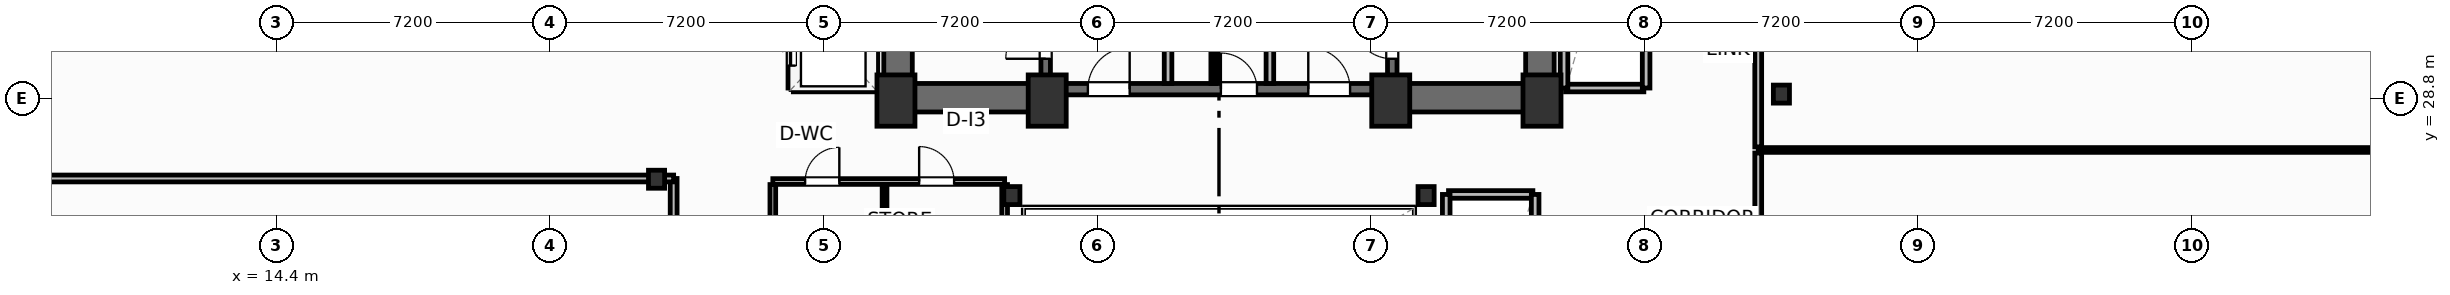
"""IFC4 building model, lengths in metres.
Left out: names, types, materials, properties, quantities, classifications, styles, units other than length and angle.
Written with IfcOpenShell. Run it as: python <this file> out.ifc"""

import sys

from ifc_helpers import new_model, si_unit, direction, frame, frame_2d, origin, origin_2d, place, context, subcontext, project, spatial, rectangle, i_section, extrude, element, fill, save


model = new_model("IFC4")
c1 = context("Model", 3, precision=1e-05, world=origin(), true_north=direction((0.0, 1.0)))
c2 = subcontext(c1, "Body", "Model", "MODEL_VIEW")
j1 = project(units=[si_unit("LENGTHUNIT", "METRE"), si_unit("PLANEANGLEUNIT", "RADIAN")], contexts=[c1])
p1 = place(None, origin())
s1 = spatial("IfcSite", under=j1, at=p1, CompositionType="ELEMENT")
p2 = place(p1, origin())
s2 = spatial("IfcBuilding", under=s1, at=p2, CompositionType="ELEMENT")
p3 = place(p2, frame((0.0, 0.0, 109.5)))
s3 = spatial("IfcBuildingStorey", under=s2, at=p3, CompositionType="ELEMENT", Elevation=109.5)
for number, where, z_axis, x_axis in (
    (1, (30.7, 28.75, 0.0), (0.0, 0.0, 1.0), (1.0, 0.0, 0.0)),
    (2, (34.68, 28.75, 0.0), (0.0, 0.0, 1.0), (1.0, 0.0, 0.0)),
    (3, (43.72, 28.75, 0.0), (0.0, 0.0, 1.0), (1.0, 0.0, 0.0)),
    (4, (47.7, 28.75, 0.0), (0.0, 0.0, 1.0), (1.0, 0.0, 0.0)),
):
    element("IfcColumn", number, at=place(p3, frame(where, z_axis=z_axis, x_axis=x_axis)), inside=s3, PredefinedType="COLUMN", context=c2, shape_type="SweptSolid", body=[
        extrude(rectangle(XDim=1.0, YDim=1.35, at=origin_2d()), origin(), (0.0, 0.0, 1.0), 3.7),
    ])
for number, where, z_axis, x_axis in (
    (5, (33.75, 26.25, 0.0), (0.0, 0.0, 1.0), (1.0, 0.0, 0.0)),
    (6, (44.65, 26.25, 0.0), (0.0, 0.0, 1.0), (1.0, 0.0, 0.0)),
    (7, (24.4, 26.68, 0.0), (0.0, 0.0, 1.0), (1.0, 0.0, 0.0)),
    (8, (54.0, 28.92, 0.0), (0.0, 0.0, 1.0), (1.0, 0.0, 0.0)),
):
    element("IfcColumn", number, at=place(p3, frame(where, z_axis=z_axis, x_axis=x_axis)), inside=s3, PredefinedType="COLUMN", context=c2, shape_type="SweptSolid", body=[
        extrude(i_section(OverallWidth=0.424, OverallDepth=0.474, WebThickness=0.048, FlangeThickness=0.077, FilletRadius=0.025, at=origin_2d()), origin(), (0.0, 0.0, 1.0), 3.7),
    ])
for number, where, z_axis, x_axis in (
    (9, (30.755, 29.2, 0.0), (0.0, 0.0, 1.0), (0.0, 1.0, 0.0)),
    (10, (47.645, 29.2, 0.0), (0.0, 0.0, 1.0), (0.0, 1.0, 0.0)),
):
    element("IfcWall", number, at=place(p3, frame(where, z_axis=z_axis, x_axis=x_axis)), inside=s3, PredefinedType="SHEAR", context=c2, shape_type="SweptSolid", body=[
        extrude(rectangle(XDim=9.22, YDim=0.75, at=frame_2d((4.61, 0.0))), origin(), (0.0, 0.0, 1.0), 3.45),
    ])
p4 = place(p3, frame((30.38, 28.825, 0.0), z_axis=(0.0, 0.0, 1.0), x_axis=(1.0, 0.0, 0.0)))
e11 = element("IfcWall", 11, at=p4, inside=s3, PredefinedType="SHEAR", context=c2, shape_type="SweptSolid", body=[
    extrude(rectangle(XDim=4.42, YDim=0.75, at=frame_2d((2.21, 0.0))), origin(), (0.0, 0.0, 1.0), 3.45),
])
p5 = place(p3, frame((43.6, 28.825, 0.0), z_axis=(0.0, 0.0, 1.0), x_axis=(1.0, 0.0, 0.0)))
e12 = element("IfcWall", 12, at=p5, inside=s3, PredefinedType="SHEAR", context=c2, shape_type="SweptSolid", body=[
    extrude(rectangle(XDim=4.42, YDim=0.75, at=frame_2d((2.21, 0.0))), origin(), (0.0, 0.0, 1.0), 3.45),
])
p6 = place(p3, frame((34.8, 29.05, 0.0), z_axis=(0.0, 0.0, 1.0), x_axis=(1.0, 0.0, 0.0)))
e13 = element("IfcWall", 13, at=p6, inside=s3, PredefinedType="SHEAR", context=c2, shape_type="SweptSolid", body=[
    extrude(rectangle(XDim=8.8, YDim=0.3, at=frame_2d((4.4, 0.0))), origin(), (0.0, 0.0, 1.0), 3.45),
])
p7 = place(p6, frame((0.95, 0.0, 0.0)))
e14 = element("IfcOpeningElement", 14, at=p7, cuts=e13, PredefinedType="OPENING", context=c2, shape_type="SweptSolid", body=[
    extrude(rectangle(XDim=1.1, YDim=2.15, at=frame_2d((0.55, 1.075))), frame((0.0, 0.16, 0.0), z_axis=(0.0, -1.0, 0.0), x_axis=(1.0, 0.0, 0.0)), (0.0, 0.0, 1.0), 0.32),
])
p8 = place(p6, frame((6.75, 0.0, 0.0)))
e15 = element("IfcOpeningElement", 15, at=p8, cuts=e13, PredefinedType="OPENING", context=c2, shape_type="SweptSolid", body=[
    extrude(rectangle(XDim=1.1, YDim=2.15, at=frame_2d((0.55, 1.075))), frame((0.0, 0.16, 0.0), z_axis=(0.0, -1.0, 0.0), x_axis=(1.0, 0.0, 0.0)), (0.0, 0.0, 1.0), 0.32),
])
p9 = place(p6, frame((4.45, 0.0, 0.0)))
e16 = element("IfcOpeningElement", 16, at=p9, cuts=e13, PredefinedType="OPENING", context=c2, shape_type="SweptSolid", body=[
    extrude(rectangle(XDim=0.95, YDim=2.15, at=frame_2d((0.475, 1.075))), frame((0.0, 0.16, 0.0), z_axis=(0.0, -1.0, 0.0), x_axis=(1.0, 0.0, 0.0)), (0.0, 0.0, 1.0), 0.32),
])
p10 = place(p3, frame((34.64, 29.2, 0.0), z_axis=(0.0, 0.0, 1.0), x_axis=(0.0, 1.0, 0.0)))
e17 = element("IfcWall", 17, at=p10, inside=s3, PredefinedType="SHEAR", context=c2, shape_type="SweptSolid", body=[
    extrude(rectangle(XDim=9.22, YDim=0.25, at=frame_2d((4.61, 0.0))), origin(), (0.0, 0.0, 1.0), 3.45),
])
p11 = place(p10, frame((0.65, 0.0, 0.0)))
e18 = element("IfcOpeningElement", 18, at=p11, cuts=e17, PredefinedType="OPENING", context=c2, shape_type="SweptSolid", body=[
    extrude(rectangle(XDim=1.05, YDim=2.15, at=frame_2d((0.525, 1.075))), frame((0.0, 0.135, 0.0), z_axis=(0.0, -1.0, 0.0), x_axis=(1.0, 0.0, 0.0)), (0.0, 0.0, 1.0), 0.27),
])
p12 = place(p3, frame((43.76, 29.2, 0.0), z_axis=(0.0, 0.0, 1.0), x_axis=(0.0, 1.0, 0.0)))
e19 = element("IfcWall", 19, at=p12, inside=s3, PredefinedType="SHEAR", context=c2, shape_type="SweptSolid", body=[
    extrude(rectangle(XDim=9.22, YDim=0.25, at=frame_2d((4.61, 0.0))), origin(), (0.0, 0.0, 1.0), 3.45),
])
p13 = place(p12, frame((0.65, 0.0, 0.0)))
e20 = element("IfcOpeningElement", 20, at=p13, cuts=e19, PredefinedType="OPENING", context=c2, shape_type="SweptSolid", body=[
    extrude(rectangle(XDim=1.05, YDim=2.15, at=frame_2d((0.525, 1.075))), frame((0.0, 0.135, 0.0), z_axis=(0.0, -1.0, 0.0), x_axis=(1.0, 0.0, 0.0)), (0.0, 0.0, 1.0), 0.27),
])
p14 = place(p3, frame((24.85, 19.24, 0.0), z_axis=(0.0, 0.0, 1.0), x_axis=(0.0, 1.0, 0.0)))
e21 = element("IfcWall", 21, at=p14, inside=s3, PredefinedType="PARTITIONING", context=c2, shape_type="SweptSolid", body=[
    extrude(rectangle(XDim=7.46, YDim=0.18, at=frame_2d((3.73, 0.0))), origin(), (0.0, 0.0, 1.0), 3.45),
])
p15 = place(p14, frame((3.235, 0.0, 0.0)))
e22 = element("IfcOpeningElement", 22, at=p15, cuts=e21, PredefinedType="OPENING", context=c2, shape_type="SweptSolid", body=[
    extrude(rectangle(XDim=0.95, YDim=2.05, at=frame_2d((0.475, 1.025))), frame((0.0, 0.1, 0.0), z_axis=(0.0, -1.0, 0.0), x_axis=(1.0, 0.0, 0.0)), (0.0, 0.0, 1.0), 0.2),
])
p16 = place(p3, frame((-0.071, 26.7, 0.0), z_axis=(0.0, 0.0, 1.0), x_axis=(1.0, 0.0, 0.0)))
e23 = element("IfcWall", 23, at=p16, inside=s3, PredefinedType="PARTITIONING", context=c2, shape_type="SweptSolid", body=[
    extrude(rectangle(XDim=24.921, YDim=0.18, at=frame_2d((12.46, 0.0))), origin(), (0.0, 0.0, 1.0), 2.662),
])
p17 = place(p3, frame((53.39, 19.3, 0.0), z_axis=(0.0, 0.0, 1.0), x_axis=(0.0, 1.0, 0.0)))
e24 = element("IfcWall", 24, at=p17, inside=s3, PredefinedType="PARTITIONING", context=c2, shape_type="SweptSolid", body=[
    extrude(rectangle(XDim=8.07, YDim=0.18, at=frame_2d((4.035, 0.0))), origin(), (0.0, 0.0, 1.0), 3.45),
])
p18 = place(p17, frame((2.2, 0.0, 0.0)))
e25 = element("IfcOpeningElement", 25, at=p18, cuts=e24, PredefinedType="OPENING", context=c2, shape_type="SweptSolid", body=[
    extrude(rectangle(XDim=0.92, YDim=2.05, at=frame_2d((0.46, 1.025))), frame((0.0, 0.1, 0.0), z_axis=(0.0, -1.0, 0.0), x_axis=(1.0, 0.0, 0.0)), (0.0, 0.0, 1.0), 0.2),
])
p19 = place(p3, frame((53.39, 27.53, 0.0), z_axis=(0.0, 0.0, 1.0), x_axis=(0.0, 1.0, 0.0)))
e26 = element("IfcWall", 26, at=p19, inside=s3, PredefinedType="PARTITIONING", context=c2, shape_type="SweptSolid", body=[
    extrude(rectangle(XDim=11.67, YDim=0.18, at=frame_2d((5.835, 0.0))), origin(), (0.0, 0.0, 1.0), 3.45),
])
p20 = place(p19, frame((5.8, 0.0, 0.0)))
e27 = element("IfcOpeningElement", 27, at=p20, cuts=e26, PredefinedType="OPENING", context=c2, shape_type="SweptSolid", body=[
    extrude(rectangle(XDim=0.92, YDim=2.05, at=frame_2d((0.46, 1.025))), frame((0.0, 0.1, 0.0), z_axis=(0.0, -1.0, 0.0), x_axis=(1.0, 0.0, 0.0)), (0.0, 0.0, 1.0), 0.2),
])
p21 = place(p3, frame((53.39, 27.45, 0.0), z_axis=(0.0, 0.0, 1.0), x_axis=(1.0, 0.0, 0.0)))
e28 = element("IfcWall", 28, at=p21, inside=s3, PredefinedType="PARTITIONING", context=c2, shape_type="SweptSolid", body=[
    extrude(rectangle(XDim=23.61, YDim=0.125, at=frame_2d((11.805, 0.0))), origin(), (0.0, 0.0, 1.0), 3.45),
])
for number, where, z_axis, x_axis in (
    (29, (37.86, 29.2, 0.0), (0.0, 0.0, 1.0), (0.0, 1.0, 0.0)),
    (30, (40.54, 29.2, 0.0), (0.0, 0.0, 1.0), (0.0, 1.0, 0.0)),
):
    element("IfcWall", number, at=place(p3, frame(where, z_axis=z_axis, x_axis=x_axis)), inside=s3, PredefinedType="PARTITIONING", context=c2, shape_type="SweptSolid", body=[
        extrude(rectangle(XDim=5.18, YDim=0.2, at=frame_2d((2.59, 0.0))), origin(), (0.0, 0.0, 1.0), 3.45),
    ])
p22 = place(p3, frame((39.05, 29.2, 0.0), z_axis=(0.0, 0.0, 1.0), x_axis=(0.0, 1.0, 0.0)))
e31 = element("IfcWall", 31, at=p22, inside=s3, PredefinedType="PARTITIONING", context=c2, shape_type="SweptSolid", body=[
    extrude(rectangle(XDim=5.22, YDim=0.125, at=frame_2d((2.61, 0.0))), origin(), (0.0, 0.0, 1.0), 3.45),
])
p23 = place(p22, frame((2.05, 0.0, 0.0)))
e32 = element("IfcOpeningElement", 32, at=p23, cuts=e31, PredefinedType="OPENING", context=c2, shape_type="SweptSolid", body=[
    extrude(rectangle(XDim=0.85, YDim=2.05, at=frame_2d((0.425, 1.025))), frame((0.0, 0.073, 0.0), z_axis=(0.0, -1.0, 0.0), x_axis=(1.0, 0.0, 0.0)), (0.0, 0.0, 1.0), 0.145),
])
p24 = place(p3, frame((27.46, 26.62, 0.0), z_axis=(0.0, 0.0, 1.0), x_axis=(1.0, 0.0, 0.0)))
e33 = element("IfcWall", 33, at=p24, inside=s3, PredefinedType="PARTITIONING", context=c2, shape_type="SweptSolid", body=[
    extrude(rectangle(XDim=6.1, YDim=0.15, at=frame_2d((3.05, 0.0))), origin(), (0.0, 0.0, 1.0), 2.662),
])
p25 = place(p24, frame((0.85, 0.0, 0.0)))
e34 = element("IfcOpeningElement", 34, at=p25, cuts=e33, PredefinedType="OPENING", context=c2, shape_type="SweptSolid", body=[
    extrude(rectangle(XDim=0.9, YDim=2.05, at=frame_2d((0.45, 1.025))), frame((0.0, 0.085, 0.0), z_axis=(0.0, -1.0, 0.0), x_axis=(1.0, 0.0, 0.0)), (0.0, 0.0, 1.0), 0.17),
])
p26 = place(p24, frame((3.85, 0.0, 0.0)))
e35 = element("IfcOpeningElement", 35, at=p26, cuts=e33, PredefinedType="OPENING", context=c2, shape_type="SweptSolid", body=[
    extrude(rectangle(XDim=0.92, YDim=2.05, at=frame_2d((0.46, 1.025))), frame((0.0, 0.085, 0.0), z_axis=(0.0, -1.0, 0.0), x_axis=(1.0, 0.0, 0.0)), (0.0, 0.0, 1.0), 0.17),
])
p27 = place(p3, frame((30.4, 23.0, 0.0), z_axis=(0.0, 0.0, 1.0), x_axis=(0.0, 1.0, 0.0)))
e36 = element("IfcWall", 36, at=p27, inside=s3, PredefinedType="PARTITIONING", context=c2, shape_type="SweptSolid", body=[
    extrude(rectangle(XDim=3.54, YDim=0.125, at=frame_2d((1.77, 0.0))), origin(), (0.0, 0.0, 1.0), 3.45),
])
p28 = place(p3, frame((27.46, 19.38, 0.0), z_axis=(0.0, 0.0, 1.0), x_axis=(0.0, 1.0, 0.0)))
e37 = element("IfcWall", 37, at=p28, inside=s3, PredefinedType="PARTITIONING", context=c2, shape_type="SweptSolid", body=[
    extrude(rectangle(XDim=7.16, YDim=0.15, at=frame_2d((3.58, 0.0))), origin(), (0.0, 0.0, 1.0), 3.45),
])
p29 = place(p28, frame((1.1, 0.0, 0.0)))
e38 = element("IfcOpeningElement", 38, at=p29, cuts=e37, PredefinedType="OPENING", context=c2, shape_type="SweptSolid", body=[
    extrude(rectangle(XDim=0.95, YDim=2.05, at=frame_2d((0.475, 1.025))), frame((0.0, 0.085, 0.0), z_axis=(0.0, -1.0, 0.0), x_axis=(1.0, 0.0, 0.0)), (0.0, 0.0, 1.0), 0.17),
])
p30 = place(p3, frame((33.56, 19.38, 0.0), z_axis=(0.0, 0.0, 1.0), x_axis=(0.0, 1.0, 0.0)))
e39 = element("IfcWall", 39, at=p30, inside=s3, PredefinedType="PARTITIONING", context=c2, shape_type="SweptSolid", body=[
    extrude(rectangle(XDim=7.16, YDim=0.15, at=frame_2d((3.58, 0.0))), origin(), (0.0, 0.0, 1.0), 2.824),
])
p31 = place(p3, frame((28.0, 29.08, 0.0), z_axis=(0.0, 0.0, 1.0), x_axis=(1.0, 0.0, 0.0)))
e40 = element("IfcWall", 40, at=p31, inside=s3, PredefinedType="PARTITIONING", context=c2, shape_type="SweptSolid", body=[
    extrude(rectangle(XDim=2.1, YDim=0.2, at=frame_2d((1.05, 0.0))), origin(), (0.0, 0.0, 1.0), 3.45),
])
p32 = place(p3, frame((30.12, 29.08, 0.0), z_axis=(0.0, 0.0, 1.0), x_axis=(0.0, 1.0, 0.0)))
e41 = element("IfcWall", 41, at=p32, inside=s3, PredefinedType="PARTITIONING", context=c2, shape_type="SweptSolid", body=[
    extrude(rectangle(XDim=6.89, YDim=0.2, at=frame_2d((3.445, 0.0))), origin(), (0.0, 0.0, 1.0), 3.45),
])
p33 = place(p3, frame((27.96, 29.08, 0.0), z_axis=(0.0, 0.0, 1.0), x_axis=(0.0, 1.0, 0.0)))
e42 = element("IfcWall", 42, at=p33, inside=s3, PredefinedType="PARTITIONING", context=c2, shape_type="SweptSolid", body=[
    extrude(rectangle(XDim=6.89, YDim=0.2, at=frame_2d((3.445, 0.0))), origin(), (0.0, 0.0, 1.0), 3.45),
])
p34 = place(p33, frame((0.59, 0.0, 0.0)))
e43 = element("IfcOpeningElement", 43, at=p34, cuts=e42, PredefinedType="OPENING", context=c2, shape_type="SweptSolid", body=[
    extrude(rectangle(XDim=1.1, YDim=2.15, at=frame_2d((0.55, 1.075))), frame((0.0, 0.11, 0.0), z_axis=(0.0, -1.0, 0.0), x_axis=(1.0, 0.0, 0.0)), (0.0, 0.0, 1.0), 0.22),
])
p35 = place(p33, frame((2.89, 0.0, 0.0)))
e44 = element("IfcOpeningElement", 44, at=p35, cuts=e42, PredefinedType="OPENING", context=c2, shape_type="SweptSolid", body=[
    extrude(rectangle(XDim=1.1, YDim=2.15, at=frame_2d((0.55, 1.075))), frame((0.0, 0.11, 0.0), z_axis=(0.0, -1.0, 0.0), x_axis=(1.0, 0.0, 0.0)), (0.0, 0.0, 1.0), 0.22),
])
p36 = place(p33, frame((5.19, 0.0, 0.0)))
e45 = element("IfcOpeningElement", 45, at=p36, cuts=e42, PredefinedType="OPENING", context=c2, shape_type="SweptSolid", body=[
    extrude(rectangle(XDim=1.1, YDim=2.15, at=frame_2d((0.55, 1.075))), frame((0.0, 0.11, 0.0), z_axis=(0.0, -1.0, 0.0), x_axis=(1.0, 0.0, 0.0)), (0.0, 0.0, 1.0), 0.22),
])
p37 = place(p3, frame((48.32, 29.08, 0.0), z_axis=(0.0, 0.0, 1.0), x_axis=(1.0, 0.0, 0.0)))
e46 = element("IfcWall", 46, at=p37, inside=s3, PredefinedType="PARTITIONING", context=c2, shape_type="SweptSolid", body=[
    extrude(rectangle(XDim=2.06, YDim=0.2, at=frame_2d((1.03, 0.0))), origin(), (0.0, 0.0, 1.0), 2.662),
])
for number, where, z_axis, x_axis in (
    (47, (48.28, 29.08, 0.0), (0.0, 0.0, 1.0), (0.0, 1.0, 0.0)),
    (48, (50.44, 29.08, 0.0), (0.0, 0.0, 1.0), (0.0, 1.0, 0.0)),
):
    element("IfcWall", number, at=place(p3, frame(where, z_axis=z_axis, x_axis=x_axis)), inside=s3, PredefinedType="PARTITIONING", context=c2, shape_type="SweptSolid", body=[
        extrude(rectangle(XDim=6.89, YDim=0.2, at=frame_2d((3.445, 0.0))), origin(), (0.0, 0.0, 1.0), 3.45),
    ])
p38 = place(p3, frame((45.24, 26.28, 0.0), z_axis=(0.0, 0.0, 1.0), x_axis=(1.0, 0.0, 0.0)))
e49 = element("IfcWall", 49, at=p38, inside=s3, PredefinedType="PARTITIONING", context=c2, shape_type="SweptSolid", body=[
    extrude(rectangle(XDim=2.22, YDim=0.2, at=frame_2d((1.11, 0.0))), origin(), (0.0, 0.0, 1.0), 3.45),
])
for number, where, z_axis, x_axis in (
    (50, (45.18, 19.38, 0.0), (0.0, 0.0, 1.0), (0.0, 1.0, 0.0)),
    (51, (47.52, 19.38, 0.0), (0.0, 0.0, 1.0), (0.0, 1.0, 0.0)),
):
    element("IfcWall", number, at=place(p3, frame(where, z_axis=z_axis, x_axis=x_axis)), inside=s3, PredefinedType="PARTITIONING", context=c2, shape_type="SweptSolid", body=[
        extrude(rectangle(XDim=6.9, YDim=0.2, at=frame_2d((3.45, 0.0))), origin(), (0.0, 0.0, 1.0), 3.45),
    ])
p39 = place(p11, origin())
e52 = element("IfcDoor", 52, at=p39, inside=s3, OperationType="SINGLE_SWING_LEFT", PredefinedType="DOOR", context=c2, shape_type="SweptSolid", body=[
    extrude(rectangle(XDim=1.05, YDim=2.15, at=frame_2d((0.525, 1.075))), frame((0.0, 0.025, 0.0), z_axis=(0.0, -1.0, 0.0), x_axis=(1.0, 0.0, 0.0)), (0.0, 0.0, 1.0), 0.05),
])
fill(e18, e52)
p40 = place(p13, origin())
e53 = element("IfcDoor", 53, at=p40, inside=s3, OperationType="SINGLE_SWING_RIGHT", PredefinedType="DOOR", context=c2, shape_type="SweptSolid", body=[
    extrude(rectangle(XDim=1.05, YDim=2.15, at=frame_2d((0.525, 1.075))), frame((0.0, 0.025, 0.0), z_axis=(0.0, -1.0, 0.0), x_axis=(1.0, 0.0, 0.0)), (0.0, 0.0, 1.0), 0.05),
])
fill(e20, e53)
p41 = place(p7, origin())
e54 = element("IfcDoor", 54, at=p41, inside=s3, OperationType="SINGLE_SWING_RIGHT", PredefinedType="DOOR", context=c2, shape_type="SweptSolid", body=[
    extrude(rectangle(XDim=1.1, YDim=2.15, at=frame_2d((0.55, 1.075))), frame((0.0, 0.025, 0.0), z_axis=(0.0, -1.0, 0.0), x_axis=(1.0, 0.0, 0.0)), (0.0, 0.0, 1.0), 0.05),
])
fill(e14, e54)
p42 = place(p8, origin())
e55 = element("IfcDoor", 55, at=p42, inside=s3, OperationType="SINGLE_SWING_LEFT", PredefinedType="DOOR", context=c2, shape_type="SweptSolid", body=[
    extrude(rectangle(XDim=1.1, YDim=2.15, at=frame_2d((0.55, 1.075))), frame((0.0, 0.025, 0.0), z_axis=(0.0, -1.0, 0.0), x_axis=(1.0, 0.0, 0.0)), (0.0, 0.0, 1.0), 0.05),
])
fill(e15, e55)
p43 = place(p9, origin())
e56 = element("IfcDoor", 56, at=p43, inside=s3, OperationType="SINGLE_SWING_LEFT", PredefinedType="DOOR", context=c2, shape_type="SweptSolid", body=[
    extrude(rectangle(XDim=0.95, YDim=2.15, at=frame_2d((0.475, 1.075))), frame((0.0, 0.025, 0.0), z_axis=(0.0, -1.0, 0.0), x_axis=(1.0, 0.0, 0.0)), (0.0, 0.0, 1.0), 0.05),
])
fill(e16, e56)
p44 = place(p25, origin())
e57 = element("IfcDoor", 57, at=p44, inside=s3, OperationType="SINGLE_SWING_RIGHT", PredefinedType="DOOR", context=c2, shape_type="SweptSolid", body=[
    extrude(rectangle(XDim=0.9, YDim=2.05, at=frame_2d((0.45, 1.025))), frame((0.0, 0.025, 0.0), z_axis=(0.0, -1.0, 0.0), x_axis=(1.0, 0.0, 0.0)), (0.0, 0.0, 1.0), 0.05),
])
fill(e34, e57)
p45 = place(p26, origin())
e58 = element("IfcDoor", 58, at=p45, inside=s3, OperationType="SINGLE_SWING_LEFT", PredefinedType="DOOR", context=c2, shape_type="SweptSolid", body=[
    extrude(rectangle(XDim=0.92, YDim=2.05, at=frame_2d((0.46, 1.025))), frame((0.0, 0.025, 0.0), z_axis=(0.0, -1.0, 0.0), x_axis=(1.0, 0.0, 0.0)), (0.0, 0.0, 1.0), 0.05),
])
fill(e35, e58)
p46 = place(p34, origin())
e59 = element("IfcDoor", 59, at=p46, inside=s3, OperationType="SLIDING_TO_LEFT", PredefinedType="DOOR", context=c2, shape_type="SweptSolid", body=[
    extrude(rectangle(XDim=1.1, YDim=2.15, at=frame_2d((0.55, 1.075))), frame((0.0, 0.025, 0.0), z_axis=(0.0, -1.0, 0.0), x_axis=(1.0, 0.0, 0.0)), (0.0, 0.0, 1.0), 0.05),
])
fill(e43, e59)
save(model, sys.argv[1])
